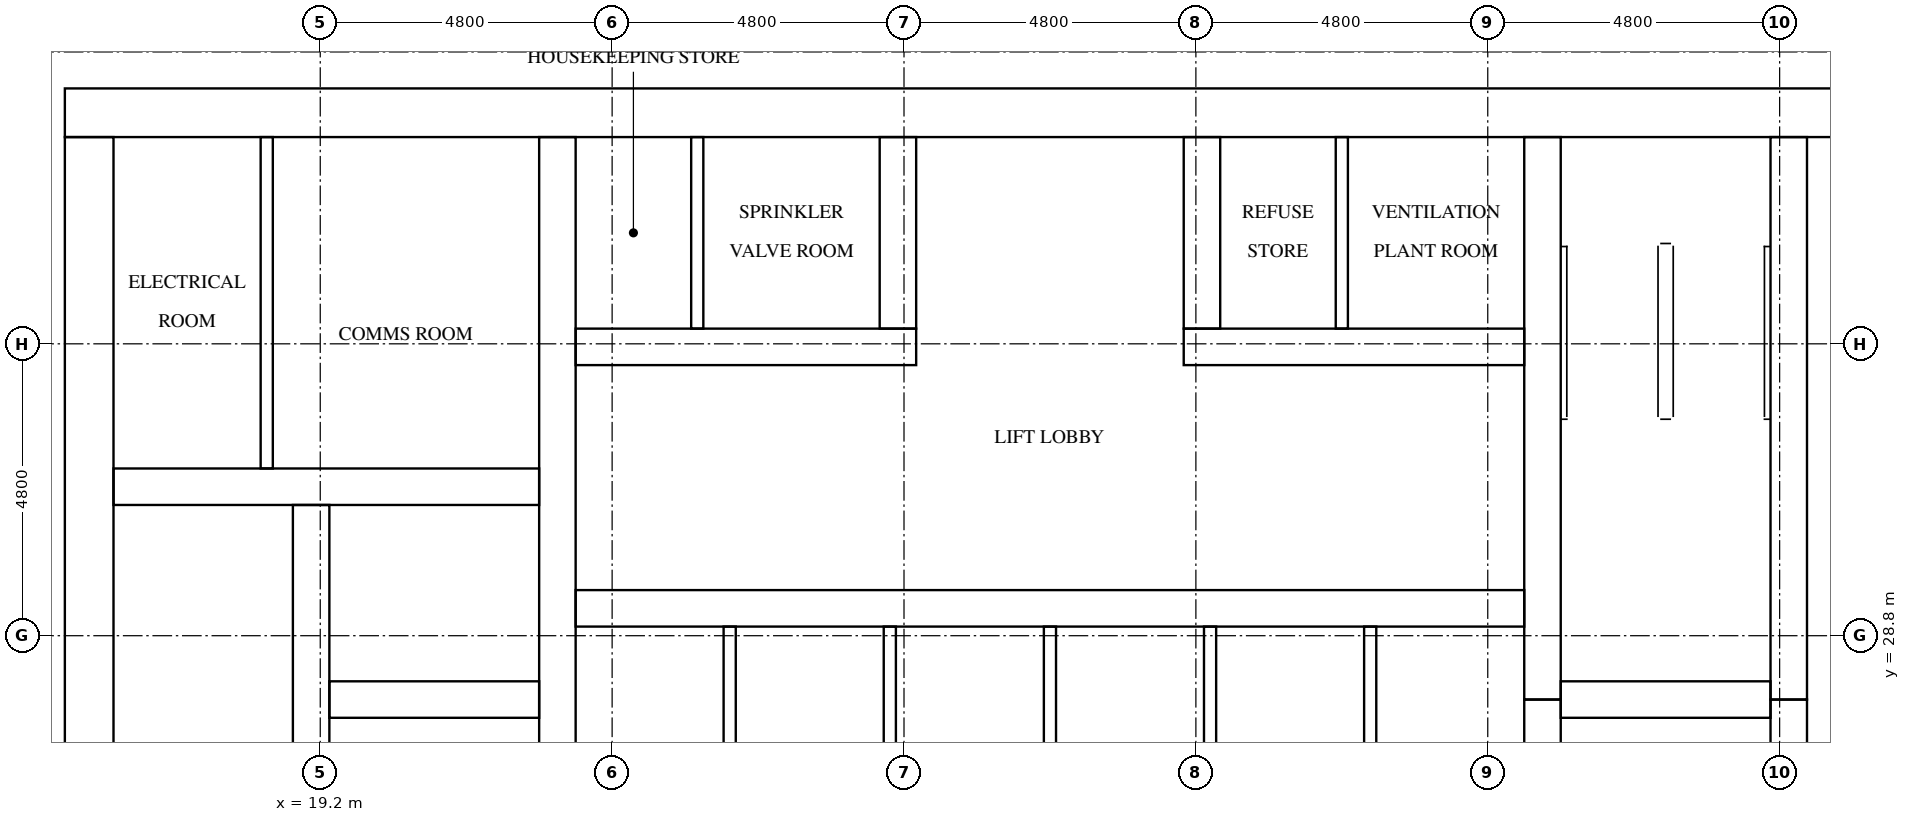
"""IFC4 building model, lengths in metres.
Left out: names, types, materials, properties, quantities, classifications, styles, units other than length and angle.
Written with IfcOpenShell. Run it as: python <this file> out.ifc"""

import sys

from ifc_helpers import new_model, si_unit, direction, frame, frame_2d, origin, place, context, subcontext, project, spatial, rectangle, extrude, element, fill, save


model = new_model("IFC4")
c1 = context("Model", 3, precision=1e-05, world=origin(), true_north=direction((0.0, 1.0)))
c2 = subcontext(c1, "Body", "Model", "MODEL_VIEW")
j1 = project(units=[si_unit("LENGTHUNIT", "METRE"), si_unit("PLANEANGLEUNIT", "RADIAN")], contexts=[c1])
p1 = place(None, origin())
s1 = spatial("IfcSite", under=j1, at=p1, CompositionType="ELEMENT")
p2 = place(p1, origin())
s2 = spatial("IfcBuilding", under=s1, at=p2, CompositionType="ELEMENT")
p3 = place(p2, frame((0.0, 0.0, 166.5)))
s3 = spatial("IfcBuildingStorey", under=s2, at=p3, CompositionType="ELEMENT", Elevation=166.5)
p4 = place(p3, frame((15.0, 37.4, 0.0), z_axis=(0.0, 0.0, 1.0), x_axis=(1.0, 0.0, 0.0)))
e1 = element("IfcWall", 1, at=p4, inside=s3, PredefinedType="SHEAR", context=c2, shape_type="SweptSolid", body=[
    extrude(rectangle(XDim=32.4, YDim=0.8, at=frame_2d((16.2, 0.0))), origin(), (0.0, 0.0, 1.0), 3.2),
])
p5 = place(p4, frame((15.3, 0.0, 0.0)))
e2 = element("IfcOpeningElement", 2, at=p5, cuts=e1, PredefinedType="OPENING", context=c2, shape_type="SweptSolid", body=[
    extrude(rectangle(XDim=1.8, YDim=2.1, at=frame_2d((0.9, 1.05))), frame((0.0, 0.41, 0.0), z_axis=(0.0, -1.0, 0.0), x_axis=(1.0, 0.0, 0.0)), (0.0, 0.0, 1.0), 0.82),
])
p6 = place(p4, frame((1.51, 0.0, 0.0)))
e3 = element("IfcOpeningElement", 3, at=p6, cuts=e1, PredefinedType="OPENING", context=c2, shape_type="SweptSolid", body=[
    extrude(rectangle(XDim=1.0, YDim=2.1, at=frame_2d((0.5, 1.05))), frame((0.0, 0.41, 0.0), z_axis=(0.0, -1.0, 0.0), x_axis=(1.0, 0.0, 0.0)), (0.0, 0.0, 1.0), 0.82),
])
p7 = place(p4, frame((5.11, 0.0, 0.0)))
e4 = element("IfcOpeningElement", 4, at=p7, cuts=e1, PredefinedType="OPENING", context=c2, shape_type="SweptSolid", body=[
    extrude(rectangle(XDim=1.0, YDim=2.1, at=frame_2d((0.5, 1.05))), frame((0.0, 0.41, 0.0), z_axis=(0.0, -1.0, 0.0), x_axis=(1.0, 0.0, 0.0)), (0.0, 0.0, 1.0), 0.82),
])
p8 = place(p3, frame((15.4, 15.8, 0.0), z_axis=(0.0, 0.0, 1.0), x_axis=(0.0, 1.0, 0.0)))
e5 = element("IfcWall", 5, at=p8, inside=s3, PredefinedType="SHEAR", context=c2, shape_type="SweptSolid", body=[
    extrude(rectangle(XDim=21.2, YDim=0.8, at=frame_2d((10.6, 0.0))), origin(), (0.0, 0.0, 1.0), 3.2),
])
p9 = place(p8, frame((4.96, 0.0, 0.0)))
e6 = element("IfcOpeningElement", 6, at=p9, cuts=e5, PredefinedType="OPENING", context=c2, shape_type="SweptSolid", body=[
    extrude(rectangle(XDim=1.2, YDim=2.1, at=frame_2d((0.6, 1.05))), frame((0.0, 0.41, 0.0), z_axis=(0.0, -1.0, 0.0), x_axis=(1.0, 0.0, 0.0)), (0.0, 0.0, 1.0), 0.82),
])
p10 = place(p3, frame((19.05, 15.8, 0.0), z_axis=(0.0, 0.0, 1.0), x_axis=(0.0, 1.0, 0.0)))
e7 = element("IfcWall", 7, at=p10, inside=s3, PredefinedType="SHEAR", context=c2, shape_type="SweptSolid", body=[
    extrude(rectangle(XDim=15.15, YDim=0.6, at=frame_2d((7.575, 0.0))), origin(), (0.0, 0.0, 1.0), 3.2),
])
p11 = place(p10, frame((9.65, 0.0, 0.0)))
e8 = element("IfcOpeningElement", 8, at=p11, cuts=e7, PredefinedType="OPENING", context=c2, shape_type="SweptSolid", body=[
    extrude(rectangle(XDim=1.1, YDim=2.1, at=frame_2d((0.55, 1.05))), frame((0.0, 0.31, 0.0), z_axis=(0.0, -1.0, 0.0), x_axis=(1.0, 0.0, 0.0)), (0.0, 0.0, 1.0), 0.62),
])
p12 = place(p10, frame((13.15, 0.0, 0.0)))
e9 = element("IfcOpeningElement", 9, at=p12, cuts=e7, PredefinedType="OPENING", context=c2, shape_type="SweptSolid", body=[
    extrude(rectangle(XDim=1.1, YDim=2.1, at=frame_2d((0.55, 1.05))), frame((0.0, 0.31, 0.0), z_axis=(0.0, -1.0, 0.0), x_axis=(1.0, 0.0, 0.0)), (0.0, 0.0, 1.0), 0.62),
])
p13 = place(p10, frame((0.4, 0.0, 0.0)))
e10 = element("IfcOpeningElement", 10, at=p13, cuts=e7, PredefinedType="OPENING", context=c2, shape_type="SweptSolid", body=[
    extrude(rectangle(XDim=1.2, YDim=2.1, at=frame_2d((0.6, 1.05))), frame((0.0, 0.31, 0.0), z_axis=(0.0, -1.0, 0.0), x_axis=(1.0, 0.0, 0.0)), (0.0, 0.0, 1.0), 0.62),
])
p14 = place(p3, frame((23.1, 15.8, 0.0), z_axis=(0.0, 0.0, 1.0), x_axis=(0.0, 1.0, 0.0)))
e11 = element("IfcWall", 11, at=p14, inside=s3, PredefinedType="SHEAR", context=c2, shape_type="SweptSolid", body=[
    extrude(rectangle(XDim=21.2, YDim=0.6, at=frame_2d((10.6, 0.0))), origin(), (0.0, 0.0, 1.0), 3.2),
])
p15 = place(p3, frame((39.3, 24.25, 0.0), z_axis=(0.0, 0.0, 1.0), x_axis=(0.0, 1.0, 0.0)))
e12 = element("IfcWall", 12, at=p15, inside=s3, PredefinedType="SHEAR", context=c2, shape_type="SweptSolid", body=[
    extrude(rectangle(XDim=3.5, YDim=0.6, at=frame_2d((1.75, 0.0))), origin(), (0.0, 0.0, 1.0), 3.2),
])
p16 = place(p3, frame((39.3, 27.75, 0.0), z_axis=(0.0, 0.0, 1.0), x_axis=(0.0, 1.0, 0.0)))
e13 = element("IfcWall", 13, at=p16, inside=s3, PredefinedType="SHEAR", context=c2, shape_type="SweptSolid", body=[
    extrude(rectangle(XDim=9.25, YDim=0.6, at=frame_2d((4.625, 0.0))), origin(), (0.0, 0.0, 1.0), 3.2),
])
p17 = place(p3, frame((43.35, 24.25, 0.0), z_axis=(0.0, 0.0, 1.0), x_axis=(0.0, 1.0, 0.0)))
e14 = element("IfcWall", 14, at=p17, inside=s3, PredefinedType="SHEAR", context=c2, shape_type="SweptSolid", body=[
    extrude(rectangle(XDim=3.5, YDim=0.6, at=frame_2d((1.75, 0.0))), origin(), (0.0, 0.0, 1.0), 3.2),
])
p18 = place(p17, frame((1.2, 0.0, 0.0)))
e15 = element("IfcOpeningElement", 15, at=p18, cuts=e14, PredefinedType="OPENING", context=c2, shape_type="SweptSolid", body=[
    extrude(rectangle(XDim=1.1, YDim=2.1, at=frame_2d((0.55, 1.05))), frame((0.0, 0.31, 0.0), z_axis=(0.0, -1.0, 0.0), x_axis=(1.0, 0.0, 0.0)), (0.0, 0.0, 1.0), 0.62),
])
p19 = place(p3, frame((43.35, 27.75, 0.0), z_axis=(0.0, 0.0, 1.0), x_axis=(0.0, 1.0, 0.0)))
e16 = element("IfcWall", 16, at=p19, inside=s3, PredefinedType="SHEAR", context=c2, shape_type="SweptSolid", body=[
    extrude(rectangle(XDim=9.25, YDim=0.6, at=frame_2d((4.625, 0.0))), origin(), (0.0, 0.0, 1.0), 3.2),
])
p20 = place(p19, frame((7.65, 0.0, 0.0)))
e17 = element("IfcOpeningElement", 17, at=p20, cuts=e16, PredefinedType="OPENING", context=c2, shape_type="SweptSolid", body=[
    extrude(rectangle(XDim=1.2, YDim=2.1, at=frame_2d((0.6, 1.05))), frame((0.0, 0.31, 0.0), z_axis=(0.0, -1.0, 0.0), x_axis=(1.0, 0.0, 0.0)), (0.0, 0.0, 1.0), 0.62),
])
p21 = place(p3, frame((19.35, 27.75, 0.0), z_axis=(0.0, 0.0, 1.0), x_axis=(1.0, 0.0, 0.0)))
e18 = element("IfcWall", 18, at=p21, inside=s3, PredefinedType="SHEAR", context=c2, shape_type="SweptSolid", body=[
    extrude(rectangle(XDim=3.45, YDim=0.6, at=frame_2d((1.725, 0.0))), origin(), (0.0, 0.0, 1.0), 3.2),
])
p22 = place(p3, frame((15.8, 31.25, 0.0), z_axis=(0.0, 0.0, 1.0), x_axis=(1.0, 0.0, 0.0)))
e19 = element("IfcWall", 19, at=p22, inside=s3, PredefinedType="SHEAR", context=c2, shape_type="SweptSolid", body=[
    extrude(rectangle(XDim=7.0, YDim=0.6, at=frame_2d((3.5, 0.0))), origin(), (0.0, 0.0, 1.0), 3.2),
])
p23 = place(p3, frame((39.6, 27.75, 0.0), z_axis=(0.0, 0.0, 1.0), x_axis=(1.0, 0.0, 0.0)))
e20 = element("IfcWall", 20, at=p23, inside=s3, PredefinedType="SHEAR", context=c2, shape_type="SweptSolid", body=[
    extrude(rectangle(XDim=3.45, YDim=0.6, at=frame_2d((1.725, 0.0))), origin(), (0.0, 0.0, 1.0), 3.2),
])
p24 = place(p3, frame((23.4, 29.25, 0.0), z_axis=(0.0, 0.0, 1.0), x_axis=(1.0, 0.0, 0.0)))
e21 = element("IfcWall", 21, at=p24, inside=s3, PredefinedType="SHEAR", context=c2, shape_type="SweptSolid", body=[
    extrude(rectangle(XDim=15.6, YDim=0.6, at=frame_2d((7.8, 0.0))), origin(), (0.0, 0.0, 1.0), 3.2),
])
p25 = place(p24, frame((0.667, 0.0, 0.0)))
e22 = element("IfcOpeningElement", 22, at=p25, cuts=e21, PredefinedType="OPENING", context=c2, shape_type="SweptSolid", body=[
    extrude(rectangle(XDim=1.1, YDim=2.1, at=frame_2d((0.55, 1.05))), frame((0.0, 0.31, 0.0), z_axis=(0.0, -1.0, 0.0), x_axis=(1.0, 0.0, 0.0)), (0.0, 0.0, 1.0), 0.62),
])
p26 = place(p24, frame((3.3, 0.0, 0.0)))
e23 = element("IfcOpeningElement", 23, at=p26, cuts=e21, PredefinedType="OPENING", context=c2, shape_type="SweptSolid", body=[
    extrude(rectangle(XDim=1.1, YDim=2.1, at=frame_2d((0.55, 1.05))), frame((0.0, 0.31, 0.0), z_axis=(0.0, -1.0, 0.0), x_axis=(1.0, 0.0, 0.0)), (0.0, 0.0, 1.0), 0.62),
])
p27 = place(p24, frame((5.933, 0.0, 0.0)))
e24 = element("IfcOpeningElement", 24, at=p27, cuts=e21, PredefinedType="OPENING", context=c2, shape_type="SweptSolid", body=[
    extrude(rectangle(XDim=1.1, YDim=2.1, at=frame_2d((0.55, 1.05))), frame((0.0, 0.31, 0.0), z_axis=(0.0, -1.0, 0.0), x_axis=(1.0, 0.0, 0.0)), (0.0, 0.0, 1.0), 0.62),
])
p28 = place(p24, frame((8.567, 0.0, 0.0)))
e25 = element("IfcOpeningElement", 25, at=p28, cuts=e21, PredefinedType="OPENING", context=c2, shape_type="SweptSolid", body=[
    extrude(rectangle(XDim=1.1, YDim=2.1, at=frame_2d((0.55, 1.05))), frame((0.0, 0.31, 0.0), z_axis=(0.0, -1.0, 0.0), x_axis=(1.0, 0.0, 0.0)), (0.0, 0.0, 1.0), 0.62),
])
p29 = place(p24, frame((11.2, 0.0, 0.0)))
e26 = element("IfcOpeningElement", 26, at=p29, cuts=e21, PredefinedType="OPENING", context=c2, shape_type="SweptSolid", body=[
    extrude(rectangle(XDim=1.1, YDim=2.1, at=frame_2d((0.55, 1.05))), frame((0.0, 0.31, 0.0), z_axis=(0.0, -1.0, 0.0), x_axis=(1.0, 0.0, 0.0)), (0.0, 0.0, 1.0), 0.62),
])
p30 = place(p24, frame((13.833, 0.0, 0.0)))
e27 = element("IfcOpeningElement", 27, at=p30, cuts=e21, PredefinedType="OPENING", context=c2, shape_type="SweptSolid", body=[
    extrude(rectangle(XDim=1.1, YDim=2.1, at=frame_2d((0.55, 1.05))), frame((0.0, 0.31, 0.0), z_axis=(0.0, -1.0, 0.0), x_axis=(1.0, 0.0, 0.0)), (0.0, 0.0, 1.0), 0.62),
])
p31 = place(p3, frame((23.4, 33.55, 0.0), z_axis=(0.0, 0.0, 1.0), x_axis=(1.0, 0.0, 0.0)))
e28 = element("IfcWall", 28, at=p31, inside=s3, PredefinedType="SHEAR", context=c2, shape_type="SweptSolid", body=[
    extrude(rectangle(XDim=5.6, YDim=0.6, at=frame_2d((2.8, 0.0))), origin(), (0.0, 0.0, 1.0), 3.2),
])
p32 = place(p31, frame((0.45, 0.0, 0.0)))
e29 = element("IfcOpeningElement", 29, at=p32, cuts=e28, PredefinedType="OPENING", context=c2, shape_type="SweptSolid", body=[
    extrude(rectangle(XDim=1.0, YDim=2.1, at=frame_2d((0.5, 1.05))), frame((0.0, 0.31, 0.0), z_axis=(0.0, -1.0, 0.0), x_axis=(1.0, 0.0, 0.0)), (0.0, 0.0, 1.0), 0.62),
])
p33 = place(p31, frame((3.05, 0.0, 0.0)))
e30 = element("IfcOpeningElement", 30, at=p33, cuts=e28, PredefinedType="OPENING", context=c2, shape_type="SweptSolid", body=[
    extrude(rectangle(XDim=1.0, YDim=2.1, at=frame_2d((0.5, 1.05))), frame((0.0, 0.31, 0.0), z_axis=(0.0, -1.0, 0.0), x_axis=(1.0, 0.0, 0.0)), (0.0, 0.0, 1.0), 0.62),
])
p34 = place(p3, frame((33.4, 33.55, 0.0), z_axis=(0.0, 0.0, 1.0), x_axis=(1.0, 0.0, 0.0)))
e31 = element("IfcWall", 31, at=p34, inside=s3, PredefinedType="SHEAR", context=c2, shape_type="SweptSolid", body=[
    extrude(rectangle(XDim=5.6, YDim=0.6, at=frame_2d((2.8, 0.0))), origin(), (0.0, 0.0, 1.0), 3.2),
])
p35 = place(p34, frame((1.05, 0.0, 0.0)))
e32 = element("IfcOpeningElement", 32, at=p35, cuts=e31, PredefinedType="OPENING", context=c2, shape_type="SweptSolid", body=[
    extrude(rectangle(XDim=1.0, YDim=2.1, at=frame_2d((0.5, 1.05))), frame((0.0, 0.31, 0.0), z_axis=(0.0, -1.0, 0.0), x_axis=(1.0, 0.0, 0.0)), (0.0, 0.0, 1.0), 0.62),
])
p36 = place(p34, frame((3.65, 0.0, 0.0)))
e33 = element("IfcOpeningElement", 33, at=p36, cuts=e31, PredefinedType="OPENING", context=c2, shape_type="SweptSolid", body=[
    extrude(rectangle(XDim=1.0, YDim=2.1, at=frame_2d((0.5, 1.05))), frame((0.0, 0.31, 0.0), z_axis=(0.0, -1.0, 0.0), x_axis=(1.0, 0.0, 0.0)), (0.0, 0.0, 1.0), 0.62),
])
for number, where, z_axis, x_axis in (
    (34, (28.7, 33.85, 0.0), (0.0, 0.0, 1.0), (0.0, 1.0, 0.0)),
    (35, (33.7, 33.85, 0.0), (0.0, 0.0, 1.0), (0.0, 1.0, 0.0)),
):
    element("IfcWall", number, at=place(p3, frame(where, z_axis=z_axis, x_axis=x_axis)), inside=s3, PredefinedType="SHEAR", context=c2, shape_type="SweptSolid", body=[
        extrude(rectangle(XDim=3.15, YDim=0.6, at=frame_2d((1.575, 0.0))), origin(), (0.0, 0.0, 1.0), 3.2),
    ])
for number, where, z_axis, x_axis in (
    (36, (25.933, 26.45, 0.0), (0.0, 0.0, 1.0), (0.0, 1.0, 0.0)),
    (37, (28.567, 26.45, 0.0), (0.0, 0.0, 1.0), (0.0, 1.0, 0.0)),
    (38, (31.2, 26.45, 0.0), (0.0, 0.0, 1.0), (0.0, 1.0, 0.0)),
    (39, (33.833, 26.45, 0.0), (0.0, 0.0, 1.0), (0.0, 1.0, 0.0)),
    (40, (36.467, 26.45, 0.0), (0.0, 0.0, 1.0), (0.0, 1.0, 0.0)),
):
    element("IfcWall", number, at=place(p3, frame(where, z_axis=z_axis, x_axis=x_axis)), inside=s3, PredefinedType="SOLIDWALL", context=c2, shape_type="SweptSolid", body=[
        extrude(rectangle(XDim=2.5, YDim=0.2, at=frame_2d((1.25, 0.0))), origin(), (0.0, 0.0, 1.0), 3.2),
    ])
p37 = place(p3, frame((18.32, 31.55, 0.0), z_axis=(0.0, 0.0, 1.0), x_axis=(0.0, 1.0, 0.0)))
e41 = element("IfcWall", 41, at=p37, inside=s3, PredefinedType="PARTITIONING", context=c2, shape_type="SweptSolid", body=[
    extrude(rectangle(XDim=5.45, YDim=0.2, at=frame_2d((2.725, 0.0))), origin(), (0.0, 0.0, 1.0), 3.2),
])
for number, where, z_axis, x_axis in (
    (42, (25.4, 33.85, 0.0), (0.0, 0.0, 1.0), (0.0, 1.0, 0.0)),
    (43, (36.0, 33.85, 0.0), (0.0, 0.0, 1.0), (0.0, 1.0, 0.0)),
):
    element("IfcWall", number, at=place(p3, frame(where, z_axis=z_axis, x_axis=x_axis)), inside=s3, PredefinedType="PARTITIONING", context=c2, shape_type="SweptSolid", body=[
        extrude(rectangle(XDim=3.15, YDim=0.2, at=frame_2d((1.575, 0.0))), origin(), (0.0, 0.0, 1.0), 3.2),
    ])
p38 = place(p25, origin())
e44 = element("IfcDoor", 44, at=p38, inside=s3, OperationType="DOUBLE_DOOR_SLIDING", PredefinedType="DOOR", context=c2, shape_type="SweptSolid", body=[
    extrude(rectangle(XDim=1.1, YDim=2.1, at=frame_2d((0.55, 1.05))), frame((0.0, 0.025, 0.0), z_axis=(0.0, -1.0, 0.0), x_axis=(1.0, 0.0, 0.0)), (0.0, 0.0, 1.0), 0.05),
])
fill(e22, e44)
p39 = place(p26, origin())
e45 = element("IfcDoor", 45, at=p39, inside=s3, OperationType="DOUBLE_DOOR_SLIDING", PredefinedType="DOOR", context=c2, shape_type="SweptSolid", body=[
    extrude(rectangle(XDim=1.1, YDim=2.1, at=frame_2d((0.55, 1.05))), frame((0.0, 0.025, 0.0), z_axis=(0.0, -1.0, 0.0), x_axis=(1.0, 0.0, 0.0)), (0.0, 0.0, 1.0), 0.05),
])
fill(e23, e45)
p40 = place(p27, origin())
e46 = element("IfcDoor", 46, at=p40, inside=s3, OperationType="DOUBLE_DOOR_SLIDING", PredefinedType="DOOR", context=c2, shape_type="SweptSolid", body=[
    extrude(rectangle(XDim=1.1, YDim=2.1, at=frame_2d((0.55, 1.05))), frame((0.0, 0.025, 0.0), z_axis=(0.0, -1.0, 0.0), x_axis=(1.0, 0.0, 0.0)), (0.0, 0.0, 1.0), 0.05),
])
fill(e24, e46)
p41 = place(p28, origin())
e47 = element("IfcDoor", 47, at=p41, inside=s3, OperationType="DOUBLE_DOOR_SLIDING", PredefinedType="DOOR", context=c2, shape_type="SweptSolid", body=[
    extrude(rectangle(XDim=1.1, YDim=2.1, at=frame_2d((0.55, 1.05))), frame((0.0, 0.025, 0.0), z_axis=(0.0, -1.0, 0.0), x_axis=(1.0, 0.0, 0.0)), (0.0, 0.0, 1.0), 0.05),
])
fill(e25, e47)
p42 = place(p29, origin())
e48 = element("IfcDoor", 48, at=p42, inside=s3, OperationType="DOUBLE_DOOR_SLIDING", PredefinedType="DOOR", context=c2, shape_type="SweptSolid", body=[
    extrude(rectangle(XDim=1.1, YDim=2.1, at=frame_2d((0.55, 1.05))), frame((0.0, 0.025, 0.0), z_axis=(0.0, -1.0, 0.0), x_axis=(1.0, 0.0, 0.0)), (0.0, 0.0, 1.0), 0.05),
])
fill(e26, e48)
p43 = place(p30, origin())
e49 = element("IfcDoor", 49, at=p43, inside=s3, OperationType="DOUBLE_DOOR_SLIDING", PredefinedType="DOOR", context=c2, shape_type="SweptSolid", body=[
    extrude(rectangle(XDim=1.1, YDim=2.1, at=frame_2d((0.55, 1.05))), frame((0.0, 0.025, 0.0), z_axis=(0.0, -1.0, 0.0), x_axis=(1.0, 0.0, 0.0)), (0.0, 0.0, 1.0), 0.05),
])
fill(e27, e49)
p44 = place(p12, origin())
e50 = element("IfcDoor", 50, at=p44, inside=s3, OperationType="DOUBLE_DOOR_SLIDING", PredefinedType="DOOR", context=c2, shape_type="SweptSolid", body=[
    extrude(rectangle(XDim=1.1, YDim=2.1, at=frame_2d((0.55, 1.05))), frame((0.0, 0.025, 0.0), z_axis=(0.0, -1.0, 0.0), x_axis=(1.0, 0.0, 0.0)), (0.0, 0.0, 1.0), 0.05),
])
fill(e9, e50)
p45 = place(p20, origin())
e51 = element("IfcDoor", 51, at=p45, inside=s3, OperationType="SINGLE_SWING_LEFT", PredefinedType="DOOR", context=c2, shape_type="SweptSolid", body=[
    extrude(rectangle(XDim=1.2, YDim=2.1, at=frame_2d((0.6, 1.05))), frame((0.0, 0.025, 0.0), z_axis=(0.0, -1.0, 0.0), x_axis=(1.0, 0.0, 0.0)), (0.0, 0.0, 1.0), 0.05),
])
fill(e17, e51)
p46 = place(p5, origin())
e52 = element("IfcDoor", 52, at=p46, inside=s3, OperationType="DOUBLE_DOOR_SINGLE_SWING", PredefinedType="DOOR", context=c2, shape_type="SweptSolid", body=[
    extrude(rectangle(XDim=1.8, YDim=2.1, at=frame_2d((0.9, 1.05))), frame((0.0, 0.025, 0.0), z_axis=(0.0, -1.0, 0.0), x_axis=(1.0, 0.0, 0.0)), (0.0, 0.0, 1.0), 0.05),
])
fill(e2, e52)
p47 = place(p6, origin())
e53 = element("IfcDoor", 53, at=p47, inside=s3, OperationType="SINGLE_SWING_RIGHT", PredefinedType="DOOR", context=c2, shape_type="SweptSolid", body=[
    extrude(rectangle(XDim=1.0, YDim=2.1, at=frame_2d((0.5, 1.05))), frame((0.0, 0.025, 0.0), z_axis=(0.0, -1.0, 0.0), x_axis=(1.0, 0.0, 0.0)), (0.0, 0.0, 1.0), 0.05),
])
fill(e3, e53)
p48 = place(p7, origin())
e54 = element("IfcDoor", 54, at=p48, inside=s3, OperationType="SINGLE_SWING_LEFT", PredefinedType="DOOR", context=c2, shape_type="SweptSolid", body=[
    extrude(rectangle(XDim=1.0, YDim=2.1, at=frame_2d((0.5, 1.05))), frame((0.0, 0.025, 0.0), z_axis=(0.0, -1.0, 0.0), x_axis=(1.0, 0.0, 0.0)), (0.0, 0.0, 1.0), 0.05),
])
fill(e4, e54)
p49 = place(p32, frame((1.0, 0.0, 0.0), z_axis=(0.0, 0.0, 1.0), x_axis=(-1.0, 0.0, 0.0)))
e55 = element("IfcDoor", 55, at=p49, inside=s3, OperationType="SINGLE_SWING_RIGHT", PredefinedType="DOOR", context=c2, shape_type="SweptSolid", body=[
    extrude(rectangle(XDim=1.0, YDim=2.1, at=frame_2d((0.5, 1.05))), frame((0.0, 0.025, 0.0), z_axis=(0.0, -1.0, 0.0), x_axis=(1.0, 0.0, 0.0)), (0.0, 0.0, 1.0), 0.05),
])
fill(e29, e55)
p50 = place(p33, frame((1.0, 0.0, 0.0), z_axis=(0.0, 0.0, 1.0), x_axis=(-1.0, 0.0, 0.0)))
e56 = element("IfcDoor", 56, at=p50, inside=s3, OperationType="SINGLE_SWING_LEFT", PredefinedType="DOOR", context=c2, shape_type="SweptSolid", body=[
    extrude(rectangle(XDim=1.0, YDim=2.1, at=frame_2d((0.5, 1.05))), frame((0.0, 0.025, 0.0), z_axis=(0.0, -1.0, 0.0), x_axis=(1.0, 0.0, 0.0)), (0.0, 0.0, 1.0), 0.05),
])
fill(e30, e56)
p51 = place(p35, frame((1.0, 0.0, 0.0), z_axis=(0.0, 0.0, 1.0), x_axis=(-1.0, 0.0, 0.0)))
e57 = element("IfcDoor", 57, at=p51, inside=s3, OperationType="SINGLE_SWING_RIGHT", PredefinedType="DOOR", context=c2, shape_type="SweptSolid", body=[
    extrude(rectangle(XDim=1.0, YDim=2.1, at=frame_2d((0.5, 1.05))), frame((0.0, 0.025, 0.0), z_axis=(0.0, -1.0, 0.0), x_axis=(1.0, 0.0, 0.0)), (0.0, 0.0, 1.0), 0.05),
])
fill(e32, e57)
p52 = place(p36, frame((1.0, 0.0, 0.0), z_axis=(0.0, 0.0, 1.0), x_axis=(-1.0, 0.0, 0.0)))
e58 = element("IfcDoor", 58, at=p52, inside=s3, OperationType="SINGLE_SWING_LEFT", PredefinedType="DOOR", context=c2, shape_type="SweptSolid", body=[
    extrude(rectangle(XDim=1.0, YDim=2.1, at=frame_2d((0.5, 1.05))), frame((0.0, 0.025, 0.0), z_axis=(0.0, -1.0, 0.0), x_axis=(1.0, 0.0, 0.0)), (0.0, 0.0, 1.0), 0.05),
])
fill(e33, e58)
save(model, sys.argv[1])
